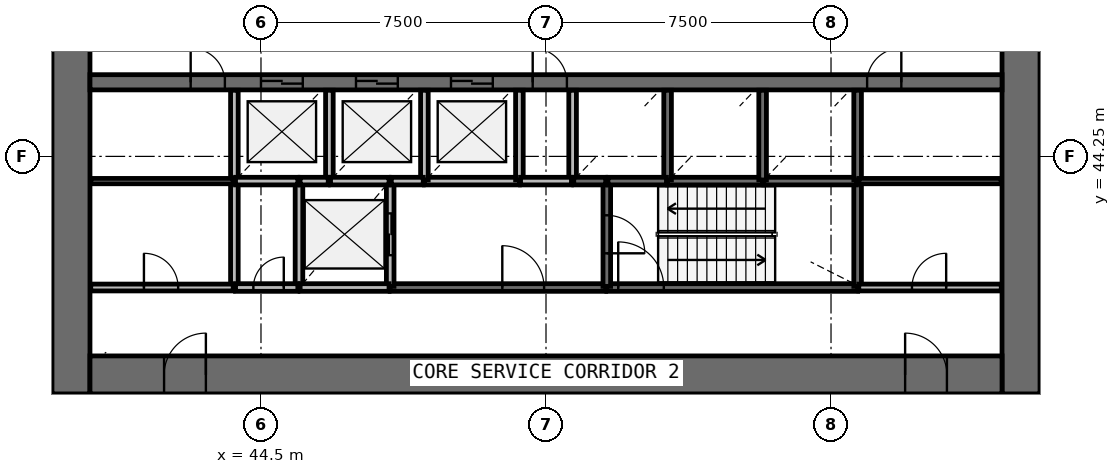
"""IFC4 building model, lengths in metres.
Left out: names, types, materials, properties, quantities, classifications, styles, units other than length and angle.
Written with IfcOpenShell. Run it as: python <this file> out.ifc"""

import sys

from ifc_helpers import new_model, si_unit, direction, frame, frame_2d, origin, place, context, subcontext, project, spatial, rectangle, extrude, source, transform, mapped, element, fill, save


model = new_model("IFC4")
c1 = context("Model", 3, precision=1e-05, world=origin(), true_north=direction((0.0, 1.0)))
c2 = subcontext(c1, "Body", "Model", "MODEL_VIEW")
j1 = project(units=[si_unit("LENGTHUNIT", "METRE"), si_unit("PLANEANGLEUNIT", "RADIAN")], contexts=[c1])
p1 = place(None, origin())
s1 = spatial("IfcSite", under=j1, at=p1, CompositionType="ELEMENT")
p2 = place(p1, origin())
s2 = spatial("IfcBuilding", under=s1, at=p2, CompositionType="ELEMENT")
p3 = place(p2, frame((0.0, 0.0, 53.4)))
s3 = spatial("IfcBuildingStorey", under=s2, at=p3, CompositionType="ELEMENT", Elevation=53.4)
p4 = place(p3, frame((64.5, 38.0, 0.0), z_axis=(0.0, 0.0, 1.0), x_axis=(0.0, 1.0, 0.0)))
e1 = element("IfcWall", 1, at=p4, inside=s3, PredefinedType="SHEAR", context=c2, shape_type="SweptSolid", body=[
    extrude(rectangle(XDim=20.0, YDim=1.0, at=frame_2d((10.0, 0.0))), origin(), (0.0, 0.0, 1.0), 4.4),
])
p5 = place(p4, frame((9.1, 0.0, 0.0)))
e2 = element("IfcOpeningElement", 2, at=p5, cuts=e1, PredefinedType="OPENING", context=c2, shape_type="SweptSolid", body=[
    extrude(rectangle(XDim=1.8, YDim=2.1, at=frame_2d((0.9, 1.05))), frame((0.0, 0.51, 0.0), z_axis=(0.0, -1.0, 0.0), x_axis=(1.0, 0.0, 0.0)), (0.0, 0.0, 1.0), 1.02),
])
p6 = place(p3, frame((39.5, 58.0, 0.0), z_axis=(0.0, 0.0, 1.0), x_axis=(0.0, -1.0, 0.0)))
e3 = element("IfcWall", 3, at=p6, inside=s3, PredefinedType="SHEAR", context=c2, shape_type="SweptSolid", body=[
    extrude(rectangle(XDim=20.0, YDim=1.0, at=frame_2d((10.0, 0.0))), origin(), (0.0, 0.0, 1.0), 4.4),
])
p7 = place(p6, frame((9.1, 0.0, 0.0)))
e4 = element("IfcOpeningElement", 4, at=p7, cuts=e3, PredefinedType="OPENING", context=c2, shape_type="SweptSolid", body=[
    extrude(rectangle(XDim=1.8, YDim=2.1, at=frame_2d((0.9, 1.05))), frame((0.0, 0.51, 0.0), z_axis=(0.0, -1.0, 0.0), x_axis=(1.0, 0.0, 0.0)), (0.0, 0.0, 1.0), 1.02),
])
p8 = place(p3, frame((40.0, 38.5, 0.0), z_axis=(0.0, 0.0, 1.0), x_axis=(1.0, 0.0, 0.0)))
e5 = element("IfcWall", 5, at=p8, inside=s3, PredefinedType="SHEAR", context=c2, shape_type="SweptSolid", body=[
    extrude(rectangle(XDim=24.0, YDim=1.0, at=frame_2d((12.0, 0.0))), origin(), (0.0, 0.0, 1.0), 4.4),
])
p9 = place(p8, frame((21.45, 0.0, 0.0)))
e6 = element("IfcOpeningElement", 6, at=p9, cuts=e5, PredefinedType="OPENING", context=c2, shape_type="SweptSolid", body=[
    extrude(rectangle(XDim=1.1, YDim=2.1, at=frame_2d((0.55, 1.05))), frame((0.0, 0.51, 0.0), z_axis=(0.0, -1.0, 0.0), x_axis=(1.0, 0.0, 0.0)), (0.0, 0.0, 1.0), 1.02),
])
p10 = place(p8, frame((1.95, 0.0, 0.0)))
e7 = element("IfcOpeningElement", 7, at=p10, cuts=e5, PredefinedType="OPENING", context=c2, shape_type="SweptSolid", body=[
    extrude(rectangle(XDim=1.1, YDim=2.1, at=frame_2d((0.55, 1.05))), frame((0.0, 0.51, 0.0), z_axis=(0.0, -1.0, 0.0), x_axis=(1.0, 0.0, 0.0)), (0.0, 0.0, 1.0), 1.02),
])
p11 = place(p3, frame((40.0, 46.2, 0.0), z_axis=(0.0, 0.0, 1.0), x_axis=(1.0, 0.0, 0.0)))
e8 = element("IfcWall", 8, at=p11, inside=s3, PredefinedType="SHEAR", context=c2, shape_type="SweptSolid", body=[
    extrude(rectangle(XDim=24.0, YDim=0.4, at=frame_2d((12.0, 0.0))), origin(), (0.0, 0.0, 1.0), 4.4),
])
p12 = place(p11, frame((4.5, 0.0, 0.0)))
e9 = element("IfcOpeningElement", 9, at=p12, cuts=e8, PredefinedType="OPENING", context=c2, shape_type="SweptSolid", body=[
    extrude(rectangle(XDim=1.1, YDim=2.1, at=frame_2d((0.55, 1.05))), frame((0.0, 0.21, 0.0), z_axis=(0.0, -1.0, 0.0), x_axis=(1.0, 0.0, 0.0)), (0.0, 0.0, 1.0), 0.42),
])
p13 = place(p11, frame((7.0, 0.0, 0.0)))
e10 = element("IfcOpeningElement", 10, at=p13, cuts=e8, PredefinedType="OPENING", context=c2, shape_type="SweptSolid", body=[
    extrude(rectangle(XDim=1.1, YDim=2.1, at=frame_2d((0.55, 1.05))), frame((0.0, 0.21, 0.0), z_axis=(0.0, -1.0, 0.0), x_axis=(1.0, 0.0, 0.0)), (0.0, 0.0, 1.0), 0.42),
])
p14 = place(p11, frame((9.5, 0.0, 0.0)))
e11 = element("IfcOpeningElement", 11, at=p14, cuts=e8, PredefinedType="OPENING", context=c2, shape_type="SweptSolid", body=[
    extrude(rectangle(XDim=1.1, YDim=2.1, at=frame_2d((0.55, 1.05))), frame((0.0, 0.21, 0.0), z_axis=(0.0, -1.0, 0.0), x_axis=(1.0, 0.0, 0.0)), (0.0, 0.0, 1.0), 0.42),
])
p15 = place(p11, frame((20.45, 0.0, 0.0)))
e12 = element("IfcOpeningElement", 12, at=p15, cuts=e8, PredefinedType="OPENING", context=c2, shape_type="SweptSolid", body=[
    extrude(rectangle(XDim=0.9, YDim=2.1, at=frame_2d((0.45, 1.05))), frame((0.0, 0.21, 0.0), z_axis=(0.0, -1.0, 0.0), x_axis=(1.0, 0.0, 0.0)), (0.0, 0.0, 1.0), 0.42),
])
p16 = place(p11, frame((2.65, 0.0, 0.0)))
e13 = element("IfcOpeningElement", 13, at=p16, cuts=e8, PredefinedType="OPENING", context=c2, shape_type="SweptSolid", body=[
    extrude(rectangle(XDim=0.9, YDim=2.1, at=frame_2d((0.45, 1.05))), frame((0.0, 0.21, 0.0), z_axis=(0.0, -1.0, 0.0), x_axis=(1.0, 0.0, 0.0)), (0.0, 0.0, 1.0), 0.42),
])
p17 = place(p11, frame((11.65, 0.0, 0.0)))
e14 = element("IfcOpeningElement", 14, at=p17, cuts=e8, PredefinedType="OPENING", context=c2, shape_type="SweptSolid", body=[
    extrude(rectangle(XDim=0.9, YDim=2.1, at=frame_2d((0.45, 1.05))), frame((0.0, 0.21, 0.0), z_axis=(0.0, -1.0, 0.0), x_axis=(1.0, 0.0, 0.0)), (0.0, 0.0, 1.0), 0.42),
])
p18 = place(p3, frame((53.6, 40.8, 0.0), z_axis=(0.0, 0.0, 1.0), x_axis=(1.0, 0.0, 0.0)))
e15 = element("IfcWall", 15, at=p18, inside=s3, PredefinedType="SOLIDWALL", context=c2, shape_type="SweptSolid", body=[
    extrude(rectangle(XDim=6.6, YDim=0.2, at=frame_2d((3.3, 0.0))), origin(), (0.0, 0.0, 1.0), 3.95),
])
p19 = place(p18, frame((0.3, 0.0, 0.0)))
e16 = element("IfcOpeningElement", 16, at=p19, cuts=e15, PredefinedType="OPENING", context=c2, shape_type="SweptSolid", body=[
    extrude(rectangle(XDim=1.2, YDim=2.1, at=frame_2d((0.6, 1.05))), frame((0.0, 0.11, 0.0), z_axis=(0.0, -1.0, 0.0), x_axis=(1.0, 0.0, 0.0)), (0.0, 0.0, 1.0), 0.22),
])
p20 = place(p3, frame((47.9, 40.8, 0.0), z_axis=(0.0, 0.0, 1.0), x_axis=(1.0, 0.0, 0.0)))
e17 = element("IfcWall", 17, at=p20, inside=s3, PredefinedType="SOLIDWALL", context=c2, shape_type="SweptSolid", body=[
    extrude(rectangle(XDim=5.67, YDim=0.2, at=frame_2d((2.835, 0.0))), origin(), (0.0, 0.0, 1.0), 3.95),
])
p21 = place(p20, frame((2.95, 0.0, 0.0)))
e18 = element("IfcOpeningElement", 18, at=p21, cuts=e17, PredefinedType="OPENING", context=c2, shape_type="SweptSolid", body=[
    extrude(rectangle(XDim=1.1, YDim=2.1, at=frame_2d((0.55, 1.05))), frame((0.0, 0.11, 0.0), z_axis=(0.0, -1.0, 0.0), x_axis=(1.0, 0.0, 0.0)), (0.0, 0.0, 1.0), 0.22),
])
for number, where, z_axis, x_axis in (
    (19, (43.8, 43.6, 0.0), (0.0, 0.0, 1.0), (0.0, -1.0, 0.0)),
    (20, (45.5, 43.6, 0.0), (0.0, 0.0, 1.0), (0.0, -1.0, 0.0)),
):
    element("IfcWall", number, at=place(p3, frame(where, z_axis=z_axis, x_axis=x_axis)), inside=s3, PredefinedType="SOLIDWALL", context=c2, shape_type="SweptSolid", body=[
        extrude(rectangle(XDim=2.8, YDim=0.2, at=frame_2d((1.4, 0.0))), origin(), (0.0, 0.0, 1.0), 3.95),
    ])
p22 = place(p3, frame((47.9, 40.83, 0.0), z_axis=(0.0, 0.0, 1.0), x_axis=(0.0, 1.0, 0.0)))
e21 = element("IfcWall", 21, at=p22, inside=s3, PredefinedType="SOLIDWALL", context=c2, shape_type="SweptSolid", body=[
    extrude(rectangle(XDim=2.77, YDim=0.2, at=frame_2d((1.385, 0.0))), origin(), (0.0, 0.0, 1.0), 3.95),
])
p23 = place(p22, frame((0.82, 0.0, 0.0)))
e22 = element("IfcOpeningElement", 22, at=p23, cuts=e21, PredefinedType="OPENING", context=c2, shape_type="SweptSolid", body=[
    extrude(rectangle(XDim=1.1, YDim=2.1, at=frame_2d((0.55, 1.05))), frame((0.0, 0.11, 0.0), z_axis=(0.0, -1.0, 0.0), x_axis=(1.0, 0.0, 0.0)), (0.0, 0.0, 1.0), 0.22),
])
p24 = place(p3, frame((60.2, 40.83, 0.0), z_axis=(0.0, 0.0, 1.0), x_axis=(0.0, 1.0, 0.0)))
e23 = element("IfcWall", 23, at=p24, inside=s3, PredefinedType="SOLIDWALL", context=c2, shape_type="SweptSolid", body=[
    extrude(rectangle(XDim=2.77, YDim=0.2, at=frame_2d((1.385, 0.0))), origin(), (0.0, 0.0, 1.0), 3.95),
])
p25 = place(p3, frame((53.6, 43.6, 0.0), z_axis=(0.0, 0.0, 1.0), x_axis=(0.0, -1.0, 0.0)))
e24 = element("IfcWall", 24, at=p25, inside=s3, PredefinedType="SOLIDWALL", context=c2, shape_type="SweptSolid", body=[
    extrude(rectangle(XDim=2.77, YDim=0.2, at=frame_2d((1.385, 0.0))), origin(), (0.0, 0.0, 1.0), 3.95),
])
p26 = place(p25, frame((0.9, 0.0, 0.0)))
e25 = element("IfcOpeningElement", 25, at=p26, cuts=e24, PredefinedType="OPENING", context=c2, shape_type="SweptSolid", body=[
    extrude(rectangle(XDim=1.0, YDim=2.1, at=frame_2d((0.5, 1.05))), frame((0.0, 0.11, 0.0), z_axis=(0.0, -1.0, 0.0), x_axis=(1.0, 0.0, 0.0)), (0.0, 0.0, 1.0), 0.22),
])
for number, where, z_axis, x_axis in (
    (26, (48.8, 43.6, 0.0), (0.0, 0.0, 1.0), (1.0, 0.0, 0.0)),
    (27, (55.2, 43.6, 0.0), (0.0, 0.0, 1.0), (1.0, 0.0, 0.0)),
):
    element("IfcWall", number, at=place(p3, frame(where, z_axis=z_axis, x_axis=x_axis)), inside=s3, PredefinedType="SOLIDWALL", context=c2, shape_type="SweptSolid", body=[
        extrude(rectangle(XDim=2.5, YDim=0.2, at=frame_2d((1.25, 0.0))), origin(), (0.0, 0.0, 1.0), 3.95),
    ])
p27 = place(p3, frame((57.73, 43.6, 0.0), z_axis=(0.0, 0.0, 1.0), x_axis=(1.0, 0.0, 0.0)))
e28 = element("IfcWall", 28, at=p27, inside=s3, PredefinedType="SOLIDWALL", context=c2, shape_type="SweptSolid", body=[
    extrude(rectangle(XDim=2.44, YDim=0.2, at=frame_2d((1.22, 0.0))), origin(), (0.0, 0.0, 1.0), 3.95),
])
p28 = place(p3, frame((45.53, 40.8, 0.0), z_axis=(0.0, 0.0, 1.0), x_axis=(1.0, 0.0, 0.0)))
e29 = element("IfcWall", 29, at=p28, inside=s3, PredefinedType="SOLIDWALL", context=c2, shape_type="SweptSolid", body=[
    extrude(rectangle(XDim=2.34, YDim=0.2, at=frame_2d((1.17, 0.0))), origin(), (0.0, 0.0, 1.0), 3.95),
])
p29 = place(p3, frame((43.8, 45.99, 0.0), z_axis=(0.0, 0.0, 1.0), x_axis=(0.0, -1.0, 0.0)))
e30 = element("IfcWall", 30, at=p29, inside=s3, PredefinedType="SOLIDWALL", context=c2, shape_type="SweptSolid", body=[
    extrude(rectangle(XDim=2.36, YDim=0.2, at=frame_2d((1.18, 0.0))), origin(), (0.0, 0.0, 1.0), 3.95),
])
p30 = place(p3, frame((46.3, 43.6, 0.0), z_axis=(0.0, 0.0, 1.0), x_axis=(0.0, 1.0, 0.0)))
e31 = element("IfcWall", 31, at=p30, inside=s3, PredefinedType="SOLIDWALL", context=c2, shape_type="SweptSolid", body=[
    extrude(rectangle(XDim=2.39, YDim=0.2, at=frame_2d((1.195, 0.0))), origin(), (0.0, 0.0, 1.0), 3.95),
])
for number, where, z_axis, x_axis in (
    (32, (48.8, 43.63, 0.0), (0.0, 0.0, 1.0), (0.0, 1.0, 0.0)),
    (33, (51.3, 43.63, 0.0), (0.0, 0.0, 1.0), (0.0, 1.0, 0.0)),
):
    element("IfcWall", number, at=place(p3, frame(where, z_axis=z_axis, x_axis=x_axis)), inside=s3, PredefinedType="SOLIDWALL", context=c2, shape_type="SweptSolid", body=[
        extrude(rectangle(XDim=2.36, YDim=0.2, at=frame_2d((1.18, 0.0))), origin(), (0.0, 0.0, 1.0), 3.95),
    ])
p31 = place(p3, frame((52.7, 45.99, 0.0), z_axis=(0.0, 0.0, 1.0), x_axis=(0.0, -1.0, 0.0)))
e34 = element("IfcWall", 34, at=p31, inside=s3, PredefinedType="SOLIDWALL", context=c2, shape_type="SweptSolid", body=[
    extrude(rectangle(XDim=2.39, YDim=0.2, at=frame_2d((1.195, 0.0))), origin(), (0.0, 0.0, 1.0), 3.95),
])
for number, where, z_axis, x_axis in (
    (35, (55.2, 43.63, 0.0), (0.0, 0.0, 1.0), (0.0, 1.0, 0.0)),
    (36, (57.7, 43.63, 0.0), (0.0, 0.0, 1.0), (0.0, 1.0, 0.0)),
    (37, (60.2, 43.63, 0.0), (0.0, 0.0, 1.0), (0.0, 1.0, 0.0)),
):
    element("IfcWall", number, at=place(p3, frame(where, z_axis=z_axis, x_axis=x_axis)), inside=s3, PredefinedType="SOLIDWALL", context=c2, shape_type="SweptSolid", body=[
        extrude(rectangle(XDim=2.36, YDim=0.2, at=frame_2d((1.18, 0.0))), origin(), (0.0, 0.0, 1.0), 3.95),
    ])
p32 = place(p3, frame((43.83, 43.6, 0.0), z_axis=(0.0, 0.0, 1.0), x_axis=(1.0, 0.0, 0.0)))
e38 = element("IfcWall", 38, at=p32, inside=s3, PredefinedType="SOLIDWALL", context=c2, shape_type="SweptSolid", body=[
    extrude(rectangle(XDim=1.64, YDim=0.2, at=frame_2d((0.82, 0.0))), origin(), (0.0, 0.0, 1.0), 3.95),
])
p33 = place(p3, frame((43.83, 40.8, 0.0), z_axis=(0.0, 0.0, 1.0), x_axis=(1.0, 0.0, 0.0)))
e39 = element("IfcWall", 39, at=p33, inside=s3, PredefinedType="SOLIDWALL", context=c2, shape_type="SweptSolid", body=[
    extrude(rectangle(XDim=1.64, YDim=0.2, at=frame_2d((0.82, 0.0))), origin(), (0.0, 0.0, 1.0), 3.95),
])
p34 = place(p33, frame((0.47, 0.0, 0.0)))
e40 = element("IfcOpeningElement", 40, at=p34, cuts=e39, PredefinedType="OPENING", context=c2, shape_type="SweptSolid", body=[
    extrude(rectangle(XDim=0.8, YDim=2.1, at=frame_2d((0.4, 1.05))), frame((0.0, 0.11, 0.0), z_axis=(0.0, -1.0, 0.0), x_axis=(1.0, 0.0, 0.0)), (0.0, 0.0, 1.0), 0.22),
])
for number, where, z_axis, x_axis in (
    (41, (46.33, 43.6, 0.0), (0.0, 0.0, 1.0), (1.0, 0.0, 0.0)),
    (42, (53.63, 43.6, 0.0), (0.0, 0.0, 1.0), (1.0, 0.0, 0.0)),
):
    element("IfcWall", number, at=place(p3, frame(where, z_axis=z_axis, x_axis=x_axis)), inside=s3, PredefinedType="SOLIDWALL", context=c2, shape_type="SweptSolid", body=[
        extrude(rectangle(XDim=1.54, YDim=0.2, at=frame_2d((0.77, 0.0))), origin(), (0.0, 0.0, 1.0), 3.95),
    ])
p35 = place(p3, frame((52.67, 43.6, 0.0), z_axis=(0.0, 0.0, 1.0), x_axis=(-1.0, 0.0, 0.0)))
e43 = element("IfcWall", 43, at=p35, inside=s3, PredefinedType="SOLIDWALL", context=c2, shape_type="SweptSolid", body=[
    extrude(rectangle(XDim=1.34, YDim=0.2, at=frame_2d((0.67, 0.0))), origin(), (0.0, 0.0, 1.0), 3.95),
])
for number, where, z_axis, x_axis in (
    (44, (47.93, 43.6, 0.0), (0.0, 0.0, 1.0), (1.0, 0.0, 0.0)),
    (45, (52.73, 43.6, 0.0), (0.0, 0.0, 1.0), (1.0, 0.0, 0.0)),
):
    element("IfcWall", number, at=place(p3, frame(where, z_axis=z_axis, x_axis=x_axis)), inside=s3, PredefinedType="SOLIDWALL", context=c2, shape_type="SweptSolid", body=[
        extrude(rectangle(XDim=0.84, YDim=0.2, at=frame_2d((0.42, 0.0))), origin(), (0.0, 0.0, 1.0), 3.95),
    ])
p36 = place(p3, frame((45.53, 43.6, 0.0), z_axis=(0.0, 0.0, 1.0), x_axis=(1.0, 0.0, 0.0)))
e46 = element("IfcWall", 46, at=p36, inside=s3, PredefinedType="SOLIDWALL", context=c2, shape_type="SweptSolid", body=[
    extrude(rectangle(XDim=0.74, YDim=0.2, at=frame_2d((0.37, 0.0))), origin(), (0.0, 0.0, 1.0), 3.95),
])
p37 = place(p3, frame((40.02, 40.8, 0.0), z_axis=(0.0, 0.0, 1.0), x_axis=(1.0, 0.0, 0.0)))
e47 = element("IfcWall", 47, at=p37, inside=s3, PredefinedType="PARTITIONING", context=c2, shape_type="SweptSolid", body=[
    extrude(rectangle(XDim=3.75, YDim=0.18, at=frame_2d((1.875, 0.0))), origin(), (0.0, 0.0, 1.0), 3.95),
])
p38 = place(p37, frame((1.4, 0.0, 0.0)))
e48 = element("IfcOpeningElement", 48, at=p38, cuts=e47, PredefinedType="OPENING", context=c2, shape_type="SweptSolid", body=[
    extrude(rectangle(XDim=0.9, YDim=2.1, at=frame_2d((0.45, 1.05))), frame((0.0, 0.1, 0.0), z_axis=(0.0, -1.0, 0.0), x_axis=(1.0, 0.0, 0.0)), (0.0, 0.0, 1.0), 0.2),
])
p39 = place(p3, frame((60.23, 40.8, 0.0), z_axis=(0.0, 0.0, 1.0), x_axis=(1.0, 0.0, 0.0)))
e49 = element("IfcWall", 49, at=p39, inside=s3, PredefinedType="PARTITIONING", context=c2, shape_type="SweptSolid", body=[
    extrude(rectangle(XDim=3.75, YDim=0.18, at=frame_2d((1.875, 0.0))), origin(), (0.0, 0.0, 1.0), 3.95),
])
p40 = place(p39, frame((1.4, 0.0, 0.0)))
e50 = element("IfcOpeningElement", 50, at=p40, cuts=e49, PredefinedType="OPENING", context=c2, shape_type="SweptSolid", body=[
    extrude(rectangle(XDim=0.9, YDim=2.1, at=frame_2d((0.45, 1.05))), frame((0.0, 0.1, 0.0), z_axis=(0.0, -1.0, 0.0), x_axis=(1.0, 0.0, 0.0)), (0.0, 0.0, 1.0), 0.2),
])
for number, where, z_axis, x_axis in (
    (51, (43.77, 43.6, 0.0), (0.0, 0.0, 1.0), (-1.0, 0.0, 0.0)),
    (52, (60.23, 43.6, 0.0), (0.0, 0.0, 1.0), (1.0, 0.0, 0.0)),
):
    element("IfcWall", number, at=place(p3, frame(where, z_axis=z_axis, x_axis=x_axis)), inside=s3, PredefinedType="PARTITIONING", context=c2, shape_type="SweptSolid", body=[
        extrude(rectangle(XDim=3.75, YDim=0.14, at=frame_2d((1.875, 0.0))), origin(), (0.0, 0.0, 1.0), 3.05),
    ])
m1 = source(origin(), c2, "Body", "SweptSolid", [
    extrude(rectangle(XDim=1.1, YDim=2.1, at=frame_2d((0.55, 1.05))), frame((0.0, 0.025, 0.0), z_axis=(0.0, -1.0, 0.0), x_axis=(1.0, 0.0, 0.0)), (0.0, 0.0, 1.0), 0.05),
])
p41 = place(p12, origin())
e53 = element("IfcDoor", 53, at=p41, inside=s3, OperationType="DOUBLE_DOOR_SLIDING", PredefinedType="USERDEFINED", context=c2, shape_type="MappedRepresentation", body=[
    mapped(m1, transform((0.0, 0.0, 0.0), scale=1.0)),
])
fill(e9, e53)
p42 = place(p13, origin())
e54 = element("IfcDoor", 54, at=p42, inside=s3, OperationType="DOUBLE_DOOR_SLIDING", PredefinedType="USERDEFINED", context=c2, shape_type="MappedRepresentation", body=[
    mapped(m1, transform((0.0, 0.0, 0.0), scale=1.0)),
])
fill(e10, e54)
p43 = place(p14, origin())
e55 = element("IfcDoor", 55, at=p43, inside=s3, OperationType="DOUBLE_DOOR_SLIDING", PredefinedType="USERDEFINED", context=c2, shape_type="MappedRepresentation", body=[
    mapped(m1, transform((0.0, 0.0, 0.0), scale=1.0)),
])
fill(e11, e55)
p44 = place(p23, origin())
e56 = element("IfcDoor", 56, at=p44, inside=s3, OperationType="DOUBLE_DOOR_SLIDING", PredefinedType="USERDEFINED", context=c2, shape_type="MappedRepresentation", body=[
    mapped(m1, transform((0.0, 0.0, 0.0), scale=1.0)),
])
fill(e22, e56)
m2 = source(origin(), c2, "Body", "SweptSolid", [
    extrude(rectangle(XDim=1.2, YDim=2.1, at=frame_2d((0.6, 1.05))), frame((0.0, 0.025, 0.0), z_axis=(0.0, -1.0, 0.0), x_axis=(1.0, 0.0, 0.0)), (0.0, 0.0, 1.0), 0.05),
])
p45 = place(p19, origin())
e57 = element("IfcDoor", 57, at=p45, inside=s3, OperationType="SINGLE_SWING_LEFT", PredefinedType="DOOR", context=c2, shape_type="MappedRepresentation", body=[
    mapped(m2, transform((0.0, 0.0, 0.0), scale=1.0)),
])
fill(e16, e57)
m3 = source(origin(), c2, "Body", "SweptSolid", [
    extrude(rectangle(XDim=1.0, YDim=2.1, at=frame_2d((0.5, 1.05))), frame((0.0, 0.025, 0.0), z_axis=(0.0, -1.0, 0.0), x_axis=(1.0, 0.0, 0.0)), (0.0, 0.0, 1.0), 0.05),
])
p46 = place(p26, origin())
e58 = element("IfcDoor", 58, at=p46, inside=s3, OperationType="SINGLE_SWING_RIGHT", PredefinedType="DOOR", context=c2, shape_type="MappedRepresentation", body=[
    mapped(m3, transform((0.0, 0.0, 0.0), scale=1.0)),
])
fill(e25, e58)
m4 = source(origin(), c2, "Body", "SweptSolid", [
    extrude(rectangle(XDim=1.1, YDim=2.1, at=frame_2d((0.55, 1.05))), frame((0.0, 0.025, 0.0), z_axis=(0.0, -1.0, 0.0), x_axis=(1.0, 0.0, 0.0)), (0.0, 0.0, 1.0), 0.05),
])
p47 = place(p21, origin())
e59 = element("IfcDoor", 59, at=p47, inside=s3, OperationType="SINGLE_SWING_LEFT", PredefinedType="DOOR", context=c2, shape_type="MappedRepresentation", body=[
    mapped(m4, transform((0.0, 0.0, 0.0), scale=1.0)),
])
fill(e18, e59)
m5 = source(origin(), c2, "Body", "SweptSolid", [
    extrude(rectangle(XDim=0.8, YDim=2.1, at=frame_2d((0.4, 1.05))), frame((0.0, 0.025, 0.0), z_axis=(0.0, -1.0, 0.0), x_axis=(1.0, 0.0, 0.0)), (0.0, 0.0, 1.0), 0.05),
])
p48 = place(p34, origin())
e60 = element("IfcDoor", 60, at=p48, inside=s3, OperationType="SINGLE_SWING_RIGHT", PredefinedType="DOOR", context=c2, shape_type="MappedRepresentation", body=[
    mapped(m5, transform((0.0, 0.0, 0.0), scale=1.0)),
])
fill(e40, e60)
m6 = source(origin(), c2, "Body", "SweptSolid", [
    extrude(rectangle(XDim=1.1, YDim=2.1, at=frame_2d((0.55, 1.05))), frame((0.0, 0.025, 0.0), z_axis=(0.0, -1.0, 0.0), x_axis=(1.0, 0.0, 0.0)), (0.0, 0.0, 1.0), 0.05),
])
p49 = place(p9, origin())
e61 = element("IfcDoor", 61, at=p49, inside=s3, OperationType="SINGLE_SWING_LEFT", PredefinedType="DOOR", context=c2, shape_type="MappedRepresentation", body=[
    mapped(m6, transform((0.0, 0.0, 0.0), scale=1.0)),
])
fill(e6, e61)
p50 = place(p10, origin())
e62 = element("IfcDoor", 62, at=p50, inside=s3, OperationType="SINGLE_SWING_RIGHT", PredefinedType="DOOR", context=c2, shape_type="MappedRepresentation", body=[
    mapped(m6, transform((0.0, 0.0, 0.0), scale=1.0)),
])
fill(e7, e62)
m7 = source(origin(), c2, "Body", "SweptSolid", [
    extrude(rectangle(XDim=0.9, YDim=2.1, at=frame_2d((0.45, 1.05))), frame((0.0, 0.025, 0.0), z_axis=(0.0, -1.0, 0.0), x_axis=(1.0, 0.0, 0.0)), (0.0, 0.0, 1.0), 0.05),
])
p51 = place(p38, origin())
e63 = element("IfcDoor", 63, at=p51, inside=s3, OperationType="SINGLE_SWING_LEFT", PredefinedType="DOOR", context=c2, shape_type="MappedRepresentation", body=[
    mapped(m7, transform((0.0, 0.0, 0.0), scale=1.0)),
])
fill(e48, e63)
p52 = place(p15, origin())
e64 = element("IfcDoor", 64, at=p52, inside=s3, OperationType="SINGLE_SWING_RIGHT", PredefinedType="DOOR", context=c2, shape_type="MappedRepresentation", body=[
    mapped(m7, transform((0.0, 0.0, 0.0), scale=1.0)),
])
fill(e12, e64)
p53 = place(p40, origin())
e65 = element("IfcDoor", 65, at=p53, inside=s3, OperationType="SINGLE_SWING_RIGHT", PredefinedType="DOOR", context=c2, shape_type="MappedRepresentation", body=[
    mapped(m7, transform((0.0, 0.0, 0.0), scale=1.0)),
])
fill(e50, e65)
p54 = place(p16, origin())
e66 = element("IfcDoor", 66, at=p54, inside=s3, OperationType="SINGLE_SWING_LEFT", PredefinedType="DOOR", context=c2, shape_type="MappedRepresentation", body=[
    mapped(m7, transform((0.0, 0.0, 0.0), scale=1.0)),
])
fill(e13, e66)
p55 = place(p17, origin())
e67 = element("IfcDoor", 67, at=p55, inside=s3, OperationType="SINGLE_SWING_LEFT", PredefinedType="DOOR", context=c2, shape_type="MappedRepresentation", body=[
    mapped(m7, transform((0.0, 0.0, 0.0), scale=1.0)),
])
fill(e14, e67)
save(model, sys.argv[1])
